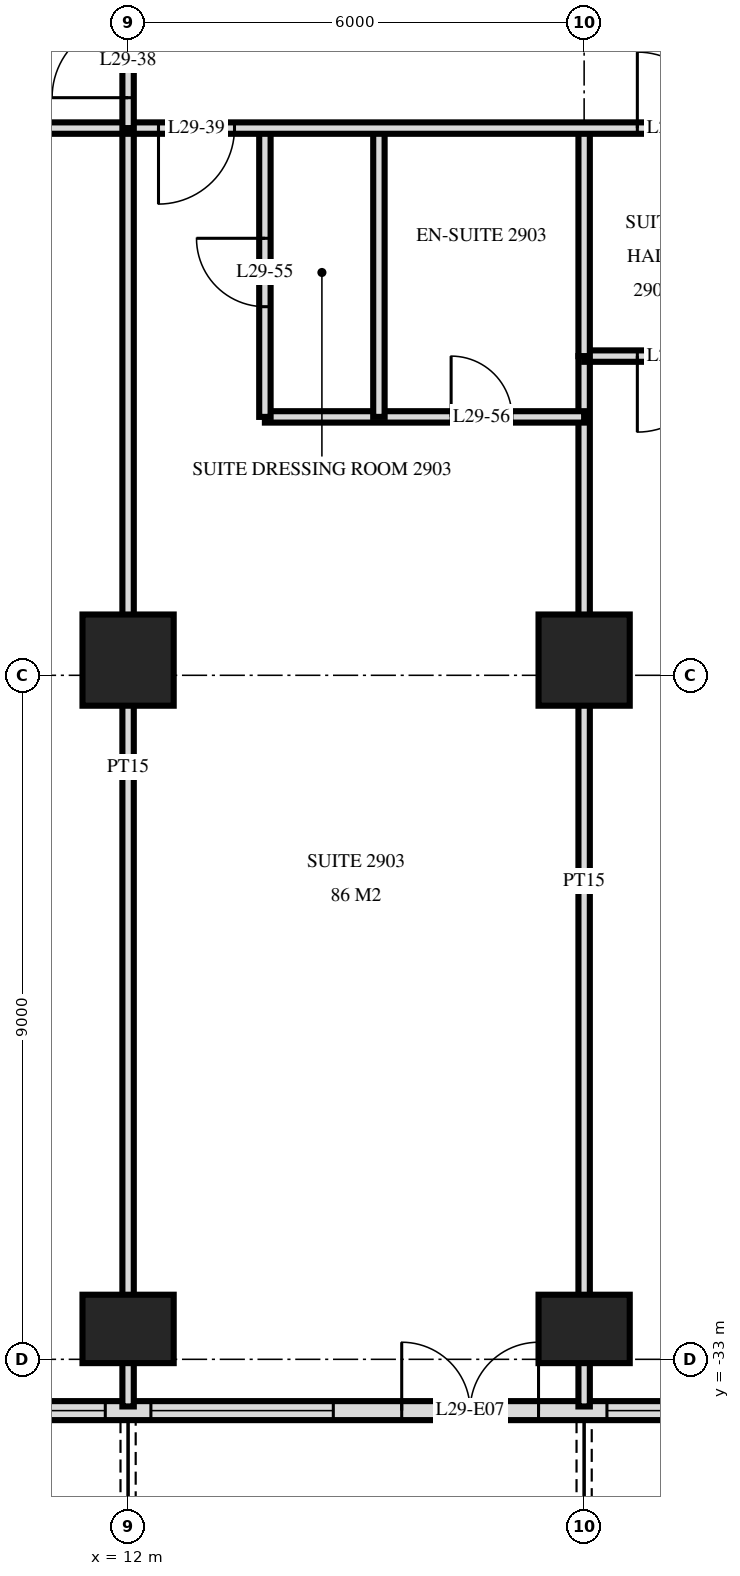
"""IFC4 building model, lengths in metres.
Left out: names, types, materials, properties, quantities, classifications, styles, units other than length and angle.
Written with IfcOpenShell. Run it as: python <this file> out.ifc"""

import sys

from ifc_helpers import new_model, si_unit, direction, frame, frame_2d, origin, origin_2d, place, context, subcontext, project, spatial, rectangle, extrude, element, fill, save


model = new_model("IFC4")
c1 = context("Model", 3, precision=1e-05, world=origin(), true_north=direction((0.0, 1.0)))
c2 = subcontext(c1, "Body", "Model", "MODEL_VIEW")
j1 = project(units=[si_unit("LENGTHUNIT", "METRE"), si_unit("PLANEANGLEUNIT", "RADIAN")], contexts=[c1])
p1 = place(None, origin())
s1 = spatial("IfcSite", under=j1, at=p1, CompositionType="ELEMENT")
p2 = place(p1, origin())
s2 = spatial("IfcBuilding", under=s1, at=p2, CompositionType="ELEMENT")
p3 = place(p2, frame((0.0, 0.0, 116.4)))
s3 = spatial("IfcBuildingStorey", under=s2, at=p3, CompositionType="ELEMENT", Elevation=116.4)
p4 = place(p3, frame((12.0, -32.6, 0.0), z_axis=(0.0, 0.0, 1.0), x_axis=(1.0, 0.0, 0.0)))
e1 = element("IfcColumn", 1, at=p4, inside=s3, PredefinedType="COLUMN", context=c2, shape_type="SweptSolid", body=[
    extrude(rectangle(XDim=1.2, YDim=0.9, at=origin_2d()), origin(), (0.0, 0.0, 1.0), 3.6),
])
p5 = place(p3, frame((12.0, -23.8, 0.0), z_axis=(0.0, 0.0, 1.0), x_axis=(1.0, 0.0, 0.0)))
e2 = element("IfcColumn", 2, at=p5, inside=s3, PredefinedType="COLUMN", context=c2, shape_type="SweptSolid", body=[
    extrude(rectangle(XDim=1.2, YDim=1.2, at=origin_2d()), origin(), (0.0, 0.0, 1.0), 3.6),
])
p6 = place(p3, frame((18.0, -32.6, 0.0), z_axis=(0.0, 0.0, 1.0), x_axis=(1.0, 0.0, 0.0)))
e3 = element("IfcColumn", 3, at=p6, inside=s3, PredefinedType="COLUMN", context=c2, shape_type="SweptSolid", body=[
    extrude(rectangle(XDim=1.2, YDim=0.9, at=origin_2d()), origin(), (0.0, 0.0, 1.0), 3.6),
])
p7 = place(p3, frame((18.0, -23.8, 0.0), z_axis=(0.0, 0.0, 1.0), x_axis=(1.0, 0.0, 0.0)))
e4 = element("IfcColumn", 4, at=p7, inside=s3, PredefinedType="COLUMN", context=c2, shape_type="SweptSolid", body=[
    extrude(rectangle(XDim=1.2, YDim=1.2, at=origin_2d()), origin(), (0.0, 0.0, 1.0), 3.6),
])
p8 = place(p3, frame((-23.675, -33.675, 0.0), z_axis=(0.0, 0.0, 1.0), x_axis=(1.0, 0.0, 0.0)))
e5 = element("IfcWall", 5, at=p8, inside=s3, PredefinedType="SOLIDWALL", context=c2, shape_type="SweptSolid", body=[
    extrude(rectangle(XDim=47.351, YDim=0.25, at=frame_2d((23.675, 0.0))), origin(), (0.0, 0.0, 1.0), 3.32),
])
p9 = place(p8, frame((0.275, 0.0, 0.3)))
e6 = element("IfcOpeningElement", 6, at=p9, cuts=e5, PredefinedType="OPENING", context=c2, shape_type="SweptSolid", body=[
    extrude(rectangle(XDim=2.4, YDim=2.1, at=frame_2d((1.2, 1.05))), frame((0.0, 0.135, 0.0), z_axis=(0.0, -1.0, 0.0), x_axis=(1.0, 0.0, 0.0)), (0.0, 0.0, 1.0), 0.27),
])
p10 = place(p8, frame((3.425, 0.0, 0.0)))
e7 = element("IfcOpeningElement", 7, at=p10, cuts=e5, PredefinedType="OPENING", context=c2, shape_type="SweptSolid", body=[
    extrude(rectangle(XDim=1.8, YDim=2.4, at=frame_2d((0.9, 1.2))), frame((0.0, 0.135, 0.0), z_axis=(0.0, -1.0, 0.0), x_axis=(1.0, 0.0, 0.0)), (0.0, 0.0, 1.0), 0.27),
])
p11 = place(p8, frame((5.975, 0.0, 0.3)))
e8 = element("IfcOpeningElement", 8, at=p11, cuts=e5, PredefinedType="OPENING", context=c2, shape_type="SweptSolid", body=[
    extrude(rectangle(XDim=2.4, YDim=2.1, at=frame_2d((1.2, 1.05))), frame((0.0, 0.135, 0.0), z_axis=(0.0, -1.0, 0.0), x_axis=(1.0, 0.0, 0.0)), (0.0, 0.0, 1.0), 0.27),
])
p12 = place(p8, frame((9.275, 0.0, 0.0)))
e9 = element("IfcOpeningElement", 9, at=p12, cuts=e5, PredefinedType="OPENING", context=c2, shape_type="SweptSolid", body=[
    extrude(rectangle(XDim=1.8, YDim=2.4, at=frame_2d((0.9, 1.2))), frame((0.0, 0.135, 0.0), z_axis=(0.0, -1.0, 0.0), x_axis=(1.0, 0.0, 0.0)), (0.0, 0.0, 1.0), 0.27),
])
p13 = place(p8, frame((12.275, 0.0, 0.0)))
e10 = element("IfcOpeningElement", 10, at=p13, cuts=e5, PredefinedType="OPENING", context=c2, shape_type="SweptSolid", body=[
    extrude(rectangle(XDim=1.8, YDim=2.4, at=frame_2d((0.9, 1.2))), frame((0.0, 0.135, 0.0), z_axis=(0.0, -1.0, 0.0), x_axis=(1.0, 0.0, 0.0)), (0.0, 0.0, 1.0), 0.27),
])
p14 = place(p8, frame((14.975, 0.0, 0.3)))
e11 = element("IfcOpeningElement", 11, at=p14, cuts=e5, PredefinedType="OPENING", context=c2, shape_type="SweptSolid", body=[
    extrude(rectangle(XDim=2.4, YDim=2.1, at=frame_2d((1.2, 1.05))), frame((0.0, 0.135, 0.0), z_axis=(0.0, -1.0, 0.0), x_axis=(1.0, 0.0, 0.0)), (0.0, 0.0, 1.0), 0.27),
])
p15 = place(p8, frame((17.975, 0.0, 0.3)))
e12 = element("IfcOpeningElement", 12, at=p15, cuts=e5, PredefinedType="OPENING", context=c2, shape_type="SweptSolid", body=[
    extrude(rectangle(XDim=2.4, YDim=2.1, at=frame_2d((1.2, 1.05))), frame((0.0, 0.135, 0.0), z_axis=(0.0, -1.0, 0.0), x_axis=(1.0, 0.0, 0.0)), (0.0, 0.0, 1.0), 0.27),
])
p16 = place(p8, frame((21.275, 0.0, 0.0)))
e13 = element("IfcOpeningElement", 13, at=p16, cuts=e5, PredefinedType="OPENING", context=c2, shape_type="SweptSolid", body=[
    extrude(rectangle(XDim=1.8, YDim=2.4, at=frame_2d((0.9, 1.2))), frame((0.0, 0.135, 0.0), z_axis=(0.0, -1.0, 0.0), x_axis=(1.0, 0.0, 0.0)), (0.0, 0.0, 1.0), 0.27),
])
p17 = place(p8, frame((24.275, 0.0, 0.0)))
e14 = element("IfcOpeningElement", 14, at=p17, cuts=e5, PredefinedType="OPENING", context=c2, shape_type="SweptSolid", body=[
    extrude(rectangle(XDim=1.8, YDim=2.4, at=frame_2d((0.9, 1.2))), frame((0.0, 0.135, 0.0), z_axis=(0.0, -1.0, 0.0), x_axis=(1.0, 0.0, 0.0)), (0.0, 0.0, 1.0), 0.27),
])
p18 = place(p8, frame((26.975, 0.0, 0.3)))
e15 = element("IfcOpeningElement", 15, at=p18, cuts=e5, PredefinedType="OPENING", context=c2, shape_type="SweptSolid", body=[
    extrude(rectangle(XDim=2.4, YDim=2.1, at=frame_2d((1.2, 1.05))), frame((0.0, 0.135, 0.0), z_axis=(0.0, -1.0, 0.0), x_axis=(1.0, 0.0, 0.0)), (0.0, 0.0, 1.0), 0.27),
])
p19 = place(p8, frame((30.275, 0.0, 0.0)))
e16 = element("IfcOpeningElement", 16, at=p19, cuts=e5, PredefinedType="OPENING", context=c2, shape_type="SweptSolid", body=[
    extrude(rectangle(XDim=1.8, YDim=2.4, at=frame_2d((0.9, 1.2))), frame((0.0, 0.135, 0.0), z_axis=(0.0, -1.0, 0.0), x_axis=(1.0, 0.0, 0.0)), (0.0, 0.0, 1.0), 0.27),
])
p20 = place(p8, frame((32.975, 0.0, 0.3)))
e17 = element("IfcOpeningElement", 17, at=p20, cuts=e5, PredefinedType="OPENING", context=c2, shape_type="SweptSolid", body=[
    extrude(rectangle(XDim=2.4, YDim=2.1, at=frame_2d((1.2, 1.05))), frame((0.0, 0.135, 0.0), z_axis=(0.0, -1.0, 0.0), x_axis=(1.0, 0.0, 0.0)), (0.0, 0.0, 1.0), 0.27),
])
p21 = place(p8, frame((35.975, 0.0, 0.3)))
e18 = element("IfcOpeningElement", 18, at=p21, cuts=e5, PredefinedType="OPENING", context=c2, shape_type="SweptSolid", body=[
    extrude(rectangle(XDim=2.4, YDim=2.1, at=frame_2d((1.2, 1.05))), frame((0.0, 0.135, 0.0), z_axis=(0.0, -1.0, 0.0), x_axis=(1.0, 0.0, 0.0)), (0.0, 0.0, 1.0), 0.27),
])
p22 = place(p8, frame((39.275, 0.0, 0.0)))
e19 = element("IfcOpeningElement", 19, at=p22, cuts=e5, PredefinedType="OPENING", context=c2, shape_type="SweptSolid", body=[
    extrude(rectangle(XDim=1.8, YDim=2.4, at=frame_2d((0.9, 1.2))), frame((0.0, 0.135, 0.0), z_axis=(0.0, -1.0, 0.0), x_axis=(1.0, 0.0, 0.0)), (0.0, 0.0, 1.0), 0.27),
])
p23 = place(p8, frame((41.975, 0.0, 0.3)))
e20 = element("IfcOpeningElement", 20, at=p23, cuts=e5, PredefinedType="OPENING", context=c2, shape_type="SweptSolid", body=[
    extrude(rectangle(XDim=2.4, YDim=2.1, at=frame_2d((1.2, 1.05))), frame((0.0, 0.135, 0.0), z_axis=(0.0, -1.0, 0.0), x_axis=(1.0, 0.0, 0.0)), (0.0, 0.0, 1.0), 0.27),
])
p24 = place(p8, frame((45.125, 0.0, 0.0)))
e21 = element("IfcOpeningElement", 21, at=p24, cuts=e5, PredefinedType="OPENING", context=c2, shape_type="SweptSolid", body=[
    extrude(rectangle(XDim=1.8, YDim=2.4, at=frame_2d((0.9, 1.2))), frame((0.0, 0.135, 0.0), z_axis=(0.0, -1.0, 0.0), x_axis=(1.0, 0.0, 0.0)), (0.0, 0.0, 1.0), 0.27),
])
p25 = place(p3, frame((18.0, -19.8, 0.0), z_axis=(0.0, 0.0, 1.0), x_axis=(0.0, 1.0, 0.0)))
e22 = element("IfcWall", 22, at=p25, inside=s3, PredefinedType="PARTITIONING", context=c2, shape_type="SweptSolid", body=[
    extrude(rectangle(XDim=3.0, YDim=0.15, at=frame_2d((1.5, 0.0))), origin(), (0.0, 0.0, 1.0), 3.32),
])
p26 = place(p3, frame((18.0, -33.62, 0.0), z_axis=(0.0, 0.0, 1.0), x_axis=(0.0, 1.0, 0.0)))
e23 = element("IfcWall", 23, at=p26, inside=s3, PredefinedType="PARTITIONING", context=c2, shape_type="SweptSolid", body=[
    extrude(rectangle(XDim=13.82, YDim=0.15, at=frame_2d((6.91, 0.0))), origin(), (0.0, 0.0, 1.0), 3.32),
])
p27 = place(p3, frame((15.3, -20.6, 0.0), z_axis=(0.0, 0.0, 1.0), x_axis=(0.0, 1.0, 0.0)))
e24 = element("IfcWall", 24, at=p27, inside=s3, PredefinedType="PARTITIONING", context=c2, shape_type="SweptSolid", body=[
    extrude(rectangle(XDim=3.8, YDim=0.15, at=frame_2d((1.9, 0.0))), origin(), (0.0, 0.0, 1.0), 3.32),
])
p28 = place(p3, frame((13.8, -20.6, 0.0), z_axis=(0.0, 0.0, 1.0), x_axis=(0.0, 1.0, 0.0)))
e25 = element("IfcWall", 25, at=p28, inside=s3, PredefinedType="PARTITIONING", context=c2, shape_type="SweptSolid", body=[
    extrude(rectangle(XDim=3.8, YDim=0.15, at=frame_2d((1.9, 0.0))), origin(), (0.0, 0.0, 1.0), 3.32),
])
p29 = place(p28, frame((1.45, 0.0, 0.0)))
e26 = element("IfcOpeningElement", 26, at=p29, cuts=e25, PredefinedType="OPENING", context=c2, shape_type="SweptSolid", body=[
    extrude(rectangle(XDim=0.9, YDim=2.1, at=frame_2d((0.45, 1.05))), frame((0.0, 0.085, 0.0), z_axis=(0.0, -1.0, 0.0), x_axis=(1.0, 0.0, 0.0)), (0.0, 0.0, 1.0), 0.17),
])
p30 = place(p3, frame((12.0, -16.8, 0.0), z_axis=(0.0, 0.0, 1.0), x_axis=(0.0, 1.0, 0.0)))
e27 = element("IfcWall", 27, at=p30, inside=s3, PredefinedType="PARTITIONING", context=c2, shape_type="SweptSolid", body=[
    extrude(rectangle(XDim=1.75, YDim=0.15, at=frame_2d((0.875, 0.0))), origin(), (0.0, 0.0, 1.0), 3.32),
])
p31 = place(p30, frame((0.4, 0.0, 0.0)))
e28 = element("IfcOpeningElement", 28, at=p31, cuts=e27, PredefinedType="OPENING", context=c2, shape_type="SweptSolid", body=[
    extrude(rectangle(XDim=1.0, YDim=2.1, at=frame_2d((0.5, 1.05))), frame((0.0, 0.085, 0.0), z_axis=(0.0, -1.0, 0.0), x_axis=(1.0, 0.0, 0.0)), (0.0, 0.0, 1.0), 0.17),
])
p32 = place(p3, frame((12.0, -33.62, 0.0), z_axis=(0.0, 0.0, 1.0), x_axis=(0.0, 1.0, 0.0)))
e29 = element("IfcWall", 29, at=p32, inside=s3, PredefinedType="PARTITIONING", context=c2, shape_type="SweptSolid", body=[
    extrude(rectangle(XDim=16.82, YDim=0.15, at=frame_2d((8.41, 0.0))), origin(), (0.0, 0.0, 1.0), 3.32),
])
p33 = place(p3, frame((13.8, -20.6, 0.0), z_axis=(0.0, 0.0, 1.0), x_axis=(1.0, 0.0, 0.0)))
e30 = element("IfcWall", 30, at=p33, inside=s3, PredefinedType="PARTITIONING", context=c2, shape_type="SweptSolid", body=[
    extrude(rectangle(XDim=4.2, YDim=0.15, at=frame_2d((2.1, 0.0))), origin(), (0.0, 0.0, 1.0), 3.32),
])
p34 = place(p33, frame((2.45, 0.0, 0.0)))
e31 = element("IfcOpeningElement", 31, at=p34, cuts=e30, PredefinedType="OPENING", context=c2, shape_type="SweptSolid", body=[
    extrude(rectangle(XDim=0.8, YDim=2.1, at=frame_2d((0.4, 1.05))), frame((0.0, 0.085, 0.0), z_axis=(0.0, -1.0, 0.0), x_axis=(1.0, 0.0, 0.0)), (0.0, 0.0, 1.0), 0.17),
])
p35 = place(p3, frame((18.0, -19.8, 0.0), z_axis=(0.0, 0.0, 1.0), x_axis=(1.0, 0.0, 0.0)))
e32 = element("IfcWall", 32, at=p35, inside=s3, PredefinedType="PARTITIONING", context=c2, shape_type="SweptSolid", body=[
    extrude(rectangle(XDim=2.4, YDim=0.15, at=frame_2d((1.2, 0.0))), origin(), (0.0, 0.0, 1.0), 3.32),
])
p36 = place(p35, frame((0.7, 0.0, 0.0)))
e33 = element("IfcOpeningElement", 33, at=p36, cuts=e32, PredefinedType="OPENING", context=c2, shape_type="SweptSolid", body=[
    extrude(rectangle(XDim=1.0, YDim=2.1, at=frame_2d((0.5, 1.05))), frame((0.0, 0.085, 0.0), z_axis=(0.0, -1.0, 0.0), x_axis=(1.0, 0.0, 0.0)), (0.0, 0.0, 1.0), 0.17),
])
p37 = place(p3, frame((-28.02, -16.8, 0.0), z_axis=(0.0, 0.0, 1.0), x_axis=(1.0, 0.0, 0.0)))
e34 = element("IfcWall", 34, at=p37, inside=s3, PredefinedType="PARTITIONING", context=c2, shape_type="SweptSolid", body=[
    extrude(rectangle(XDim=56.04, YDim=0.15, at=frame_2d((28.02, 0.0))), origin(), (0.0, 0.0, 1.0), 3.32),
])
p38 = place(p37, frame((13.17, 0.0, 0.0)))
e35 = element("IfcOpeningElement", 35, at=p38, cuts=e34, PredefinedType="OPENING", context=c2, shape_type="SweptSolid", body=[
    extrude(rectangle(XDim=1.0, YDim=2.1, at=frame_2d((0.5, 1.05))), frame((0.0, 0.085, 0.0), z_axis=(0.0, -1.0, 0.0), x_axis=(1.0, 0.0, 0.0)), (0.0, 0.0, 1.0), 0.17),
])
p39 = place(p37, frame((11.87, 0.0, 0.0)))
e36 = element("IfcOpeningElement", 36, at=p39, cuts=e34, PredefinedType="OPENING", context=c2, shape_type="SweptSolid", body=[
    extrude(rectangle(XDim=1.0, YDim=2.1, at=frame_2d((0.5, 1.05))), frame((0.0, 0.085, 0.0), z_axis=(0.0, -1.0, 0.0), x_axis=(1.0, 0.0, 0.0)), (0.0, 0.0, 1.0), 0.17),
])
p40 = place(p37, frame((8.32, 0.0, 0.0)))
e37 = element("IfcOpeningElement", 37, at=p40, cuts=e34, PredefinedType="OPENING", context=c2, shape_type="SweptSolid", body=[
    extrude(rectangle(XDim=1.0, YDim=2.1, at=frame_2d((0.5, 1.05))), frame((0.0, 0.085, 0.0), z_axis=(0.0, -1.0, 0.0), x_axis=(1.0, 0.0, 0.0)), (0.0, 0.0, 1.0), 0.17),
])
p41 = place(p37, frame((40.42, 0.0, 0.0)))
e38 = element("IfcOpeningElement", 38, at=p41, cuts=e34, PredefinedType="OPENING", context=c2, shape_type="SweptSolid", body=[
    extrude(rectangle(XDim=1.0, YDim=2.1, at=frame_2d((0.5, 1.05))), frame((0.0, 0.085, 0.0), z_axis=(0.0, -1.0, 0.0), x_axis=(1.0, 0.0, 0.0)), (0.0, 0.0, 1.0), 0.17),
])
p42 = place(p37, frame((46.72, 0.0, 0.0)))
e39 = element("IfcOpeningElement", 39, at=p42, cuts=e34, PredefinedType="OPENING", context=c2, shape_type="SweptSolid", body=[
    extrude(rectangle(XDim=1.0, YDim=2.1, at=frame_2d((0.5, 1.05))), frame((0.0, 0.085, 0.0), z_axis=(0.0, -1.0, 0.0), x_axis=(1.0, 0.0, 0.0)), (0.0, 0.0, 1.0), 0.17),
])
p43 = place(p37, frame((21.52, 0.0, 0.0)))
e40 = element("IfcOpeningElement", 40, at=p43, cuts=e34, PredefinedType="OPENING", context=c2, shape_type="SweptSolid", body=[
    extrude(rectangle(XDim=1.0, YDim=2.1, at=frame_2d((0.5, 1.05))), frame((0.0, 0.085, 0.0), z_axis=(0.0, -1.0, 0.0), x_axis=(1.0, 0.0, 0.0)), (0.0, 0.0, 1.0), 0.17),
])
p44 = place(p37, frame((30.52, 0.0, 0.0)))
e41 = element("IfcOpeningElement", 41, at=p44, cuts=e34, PredefinedType="OPENING", context=c2, shape_type="SweptSolid", body=[
    extrude(rectangle(XDim=1.0, YDim=2.1, at=frame_2d((0.5, 1.05))), frame((0.0, 0.085, 0.0), z_axis=(0.0, -1.0, 0.0), x_axis=(1.0, 0.0, 0.0)), (0.0, 0.0, 1.0), 0.17),
])
p45 = place(p37, frame((36.52, 0.0, 0.0)))
e42 = element("IfcOpeningElement", 42, at=p45, cuts=e34, PredefinedType="OPENING", context=c2, shape_type="SweptSolid", body=[
    extrude(rectangle(XDim=1.0, YDim=2.1, at=frame_2d((0.5, 1.05))), frame((0.0, 0.085, 0.0), z_axis=(0.0, -1.0, 0.0), x_axis=(1.0, 0.0, 0.0)), (0.0, 0.0, 1.0), 0.17),
])
p46 = place(p20, origin())
e43 = element("IfcWindow", 43, at=p46, inside=s3, PartitioningType="SINGLE_PANEL", PredefinedType="WINDOW", context=c2, shape_type="SweptSolid", body=[
    extrude(rectangle(XDim=2.4, YDim=2.1, at=frame_2d((1.2, 1.05))), frame((0.0, 0.03, 0.0), z_axis=(0.0, -1.0, 0.0), x_axis=(1.0, 0.0, 0.0)), (0.0, 0.0, 1.0), 0.06),
])
fill(e17, e43)
p47 = place(p21, origin())
e44 = element("IfcWindow", 44, at=p47, inside=s3, PartitioningType="SINGLE_PANEL", PredefinedType="WINDOW", context=c2, shape_type="SweptSolid", body=[
    extrude(rectangle(XDim=2.4, YDim=2.1, at=frame_2d((1.2, 1.05))), frame((0.0, 0.03, 0.0), z_axis=(0.0, -1.0, 0.0), x_axis=(1.0, 0.0, 0.0)), (0.0, 0.0, 1.0), 0.06),
])
fill(e18, e44)
p48 = place(p22, origin())
e45 = element("IfcDoor", 45, at=p48, inside=s3, OperationType="DOUBLE_DOOR_SINGLE_SWING", PredefinedType="DOOR", context=c2, shape_type="SweptSolid", body=[
    extrude(rectangle(XDim=1.8, YDim=2.4, at=frame_2d((0.9, 1.2))), frame((0.0, 0.025, 0.0), z_axis=(0.0, -1.0, 0.0), x_axis=(1.0, 0.0, 0.0)), (0.0, 0.0, 1.0), 0.05),
])
fill(e19, e45)
p49 = place(p23, origin())
e46 = element("IfcWindow", 46, at=p49, inside=s3, PartitioningType="SINGLE_PANEL", PredefinedType="WINDOW", context=c2, shape_type="SweptSolid", body=[
    extrude(rectangle(XDim=2.4, YDim=2.1, at=frame_2d((1.2, 1.05))), frame((0.0, 0.03, 0.0), z_axis=(0.0, -1.0, 0.0), x_axis=(1.0, 0.0, 0.0)), (0.0, 0.0, 1.0), 0.06),
])
fill(e20, e46)
p50 = place(p31, origin())
e47 = element("IfcDoor", 47, at=p50, inside=s3, OperationType="SINGLE_SWING_RIGHT", PredefinedType="DOOR", context=c2, shape_type="SweptSolid", body=[
    extrude(rectangle(XDim=1.0, YDim=2.1, at=frame_2d((0.5, 1.05))), frame((0.0, 0.025, 0.0), z_axis=(0.0, -1.0, 0.0), x_axis=(1.0, 0.0, 0.0)), (0.0, 0.0, 1.0), 0.05),
])
fill(e28, e47)
p51 = place(p41, frame((0.5, 0.0, 0.0), z_axis=(0.0, 0.0, 1.0), x_axis=(-1.0, 0.0, 0.0)))
e48 = element("IfcDoor", 48, at=p51, inside=s3, OperationType="SINGLE_SWING_LEFT", PredefinedType="DOOR", context=c2, shape_type="SweptSolid", body=[
    extrude(rectangle(XDim=1.0, YDim=2.1, at=frame_2d((0.0, 1.05))), frame((0.0, -0.025, 0.0), z_axis=(0.0, 1.0, 0.0), x_axis=(-1.0, 0.0, 0.0)), (0.0, 0.0, 1.0), 0.05),
])
fill(e38, e48)
p52 = place(p42, origin())
e49 = element("IfcDoor", 49, at=p52, inside=s3, OperationType="SINGLE_SWING_RIGHT", PredefinedType="DOOR", context=c2, shape_type="SweptSolid", body=[
    extrude(rectangle(XDim=1.0, YDim=2.1, at=frame_2d((0.5, 1.05))), frame((0.0, 0.025, 0.0), z_axis=(0.0, -1.0, 0.0), x_axis=(1.0, 0.0, 0.0)), (0.0, 0.0, 1.0), 0.05),
])
fill(e39, e49)
p53 = place(p29, origin())
e50 = element("IfcDoor", 50, at=p53, inside=s3, OperationType="SINGLE_SWING_LEFT", PredefinedType="DOOR", context=c2, shape_type="SweptSolid", body=[
    extrude(rectangle(XDim=0.9, YDim=2.1, at=frame_2d((0.45, 1.05))), frame((0.0, 0.025, 0.0), z_axis=(0.0, -1.0, 0.0), x_axis=(1.0, 0.0, 0.0)), (0.0, 0.0, 1.0), 0.05),
])
fill(e26, e50)
p54 = place(p34, origin())
e51 = element("IfcDoor", 51, at=p54, inside=s3, OperationType="SINGLE_SWING_RIGHT", PredefinedType="DOOR", context=c2, shape_type="SweptSolid", body=[
    extrude(rectangle(XDim=0.8, YDim=2.1, at=frame_2d((0.4, 1.05))), frame((0.0, 0.025, 0.0), z_axis=(0.0, -1.0, 0.0), x_axis=(1.0, 0.0, 0.0)), (0.0, 0.0, 1.0), 0.05),
])
fill(e31, e51)
p55 = place(p36, frame((0.5, 0.0, 0.0), z_axis=(0.0, 0.0, 1.0), x_axis=(-1.0, 0.0, 0.0)))
e52 = element("IfcDoor", 52, at=p55, inside=s3, OperationType="SINGLE_SWING_LEFT", PredefinedType="DOOR", context=c2, shape_type="SweptSolid", body=[
    extrude(rectangle(XDim=1.0, YDim=2.1, at=frame_2d((0.0, 1.05))), frame((0.0, -0.025, 0.0), z_axis=(0.0, 1.0, 0.0), x_axis=(-1.0, 0.0, 0.0)), (0.0, 0.0, 1.0), 0.05),
])
fill(e33, e52)
save(model, sys.argv[1])
